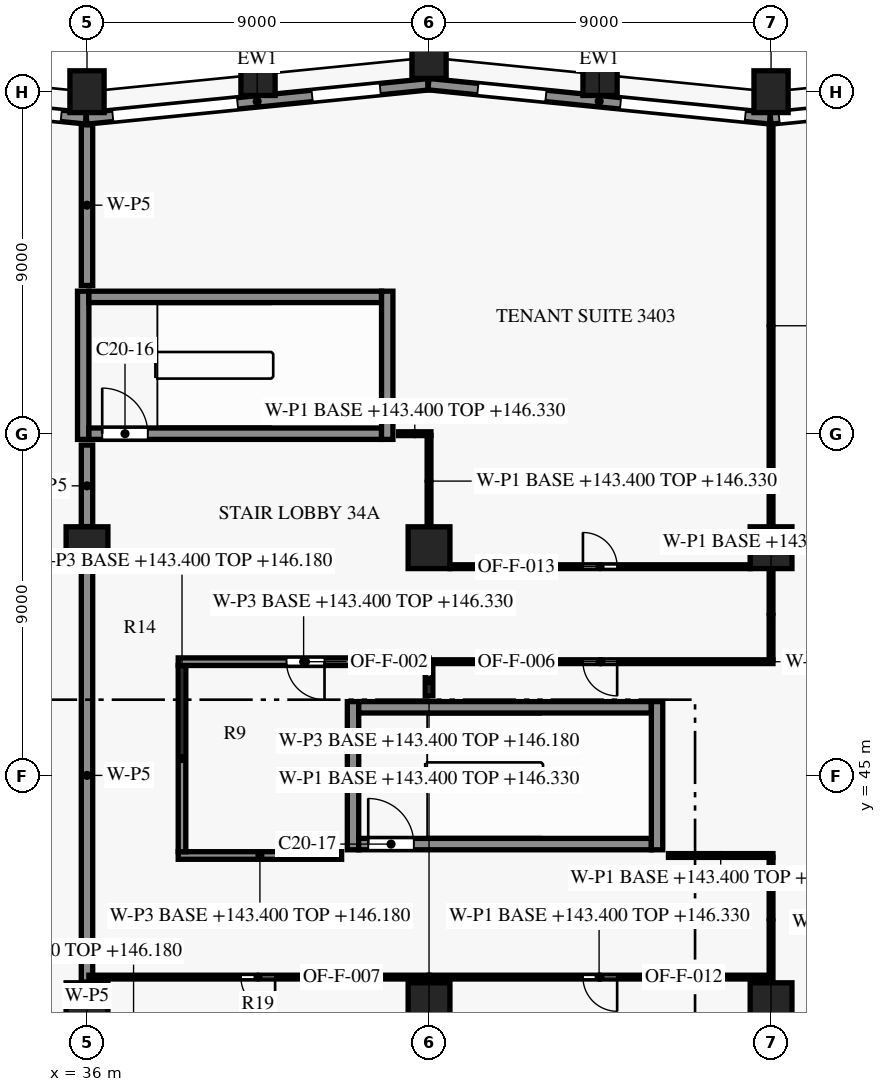
"""IFC4 building model, lengths in metres.
Left out: names, types, materials, properties, quantities, classifications, styles, units other than length and angle.
Written with IfcOpenShell. Run it as: python <this file> out.ifc"""

import sys

from ifc_helpers import new_model, si_unit, direction, frame, frame_2d, origin, origin_2d, place, context, subcontext, project, spatial, rectangle, extrude, element, fill, save


model = new_model("IFC4")
c1 = context("Model", 3, precision=1e-05, world=origin(), true_north=direction((0.0, 1.0)))
c2 = subcontext(c1, "Body", "Model", "MODEL_VIEW")
j1 = project(units=[si_unit("LENGTHUNIT", "METRE"), si_unit("PLANEANGLEUNIT", "RADIAN")], contexts=[c1])
p1 = place(None, origin())
s1 = spatial("IfcSite", under=j1, at=p1, CompositionType="ELEMENT")
p2 = place(p1, origin())
s2 = spatial("IfcBuilding", under=s1, at=p2, CompositionType="ELEMENT")
p3 = place(p2, frame((0.0, 0.0, 143.4)))
s3 = spatial("IfcBuildingStorey", under=s2, at=p3, CompositionType="ELEMENT", Elevation=143.4)
for number, where, z_axis, x_axis in (
    (1, (54.0, 63.0, 0.0), (0.0, 0.0, 1.0), (-1.0, 0.0, 0.0)),
    (2, (49.5, 63.45, 0.0), (0.0, 0.0, 1.0), (-0.995, 0.1, 0.0)),
    (3, (45.0, 63.9, 0.0), (0.0, 0.0, 1.0), (-1.0, 0.0, 0.0)),
    (4, (40.5, 63.45, 0.0), (0.0, 0.0, 1.0), (-0.995, -0.1, 0.0)),
    (5, (36.0, 63.0, 0.0), (0.0, 0.0, 1.0), (-1.0, 0.0, 0.0)),
):
    element("IfcColumn", number, at=place(p3, frame(where, z_axis=z_axis, x_axis=x_axis)), inside=s3, PredefinedType="COLUMN", context=c2, shape_type="SweptSolid", body=[
        extrude(rectangle(XDim=0.9, YDim=1.1, at=origin_2d()), origin(), (0.0, 0.0, 1.0), 3.8),
    ])
for number, where, z_axis, x_axis in (
    (6, (36.0, 39.0, 0.0), (0.0, 0.0, 1.0), (1.0, 0.0, 0.0)),
    (7, (36.0, 51.0, 0.0), (0.0, 0.0, 1.0), (1.0, 0.0, 0.0)),
    (8, (45.0, 39.0, 0.0), (0.0, 0.0, 1.0), (1.0, 0.0, 0.0)),
    (9, (45.0, 51.0, 0.0), (0.0, 0.0, 1.0), (1.0, 0.0, 0.0)),
    (10, (54.0, 39.0, 0.0), (0.0, 0.0, 1.0), (1.0, 0.0, 0.0)),
    (11, (54.0, 51.0, 0.0), (0.0, 0.0, 1.0), (1.0, 0.0, 0.0)),
):
    element("IfcColumn", number, at=place(p3, frame(where, z_axis=z_axis, x_axis=x_axis)), inside=s3, PredefinedType="COLUMN", context=c2, shape_type="SweptSolid", body=[
        extrude(rectangle(XDim=1.1, YDim=1.1, at=origin_2d()), origin(), (0.0, 0.0, 1.0), 3.8),
    ])
p4 = place(p3, frame((53.985, 62.295, 0.0), z_axis=(0.0, 0.0, 1.0), x_axis=(0.99503719021, 0.099503719021, 0.0)))
e12 = element("IfcWall", 12, at=p4, inside=s3, PredefinedType="SOLIDWALL", context=c2, shape_type="SweptSolid", body=[
    extrude(rectangle(XDim=3.678, YDim=0.3, at=frame_2d((1.839, 0.0))), origin(), (0.0, 0.0, 1.0), 3.15),
])
p5 = place(p4, frame((0.228, 0.0, 0.15)))
e13 = element("IfcOpeningElement", 13, at=p5, cuts=e12, PredefinedType="OPENING", context=c2, shape_type="SweptSolid", body=[
    extrude(rectangle(XDim=3.3, YDim=2.4, at=frame_2d((1.65, 1.2))), frame((0.0, 0.16, 0.0), z_axis=(0.0, -1.0, 0.0), x_axis=(1.0, 0.0, 0.0)), (0.0, 0.0, 1.0), 0.32),
])
p6 = place(p3, frame((44.985, 63.198, 0.0), z_axis=(0.0, 0.0, 1.0), x_axis=(0.995037993253, -0.099495688264, 0.0)))
e14 = element("IfcWall", 14, at=p6, inside=s3, PredefinedType="SOLIDWALL", context=c2, shape_type="SweptSolid", body=[
    extrude(rectangle(XDim=9.03, YDim=0.3, at=frame_2d((4.515, 0.0))), origin(), (0.0, 0.0, 1.0), 3.15),
])
p7 = place(p6, frame((1.306, 0.0, 0.75)))
e15 = element("IfcOpeningElement", 15, at=p7, cuts=e14, PredefinedType="OPENING", context=c2, shape_type="SweptSolid", body=[
    extrude(rectangle(XDim=1.8, YDim=1.8, at=frame_2d((0.9, 0.9))), frame((0.0, 0.16, 0.0), z_axis=(0.0, -1.0, 0.0), x_axis=(1.0, 0.0, 0.0)), (0.0, 0.0, 1.0), 0.32),
])
p8 = place(p6, frame((5.079, 0.0, 0.15)))
e16 = element("IfcOpeningElement", 16, at=p8, cuts=e14, PredefinedType="OPENING", context=c2, shape_type="SweptSolid", body=[
    extrude(rectangle(XDim=3.3, YDim=2.4, at=frame_2d((1.65, 1.2))), frame((0.0, 0.16, 0.0), z_axis=(0.0, -1.0, 0.0), x_axis=(1.0, 0.0, 0.0)), (0.0, 0.0, 1.0), 0.32),
])
p9 = place(p3, frame((35.985, 62.295, 0.0), z_axis=(0.0, 0.0, 1.0), x_axis=(0.995035316196, 0.099522457379, 0.0)))
e17 = element("IfcWall", 17, at=p9, inside=s3, PredefinedType="SOLIDWALL", context=c2, shape_type="SweptSolid", body=[
    extrude(rectangle(XDim=9.03, YDim=0.3, at=frame_2d((4.515, 0.0))), origin(), (0.0, 0.0, 1.0), 3.15),
])
p10 = place(p9, frame((0.696, 0.0, 0.15)))
e18 = element("IfcOpeningElement", 18, at=p10, cuts=e17, PredefinedType="OPENING", context=c2, shape_type="SweptSolid", body=[
    extrude(rectangle(XDim=3.3, YDim=2.4, at=frame_2d((1.65, 1.2))), frame((0.0, 0.16, 0.0), z_axis=(0.0, -1.0, 0.0), x_axis=(1.0, 0.0, 0.0)), (0.0, 0.0, 1.0), 0.32),
])
p11 = place(p9, frame((5.969, 0.0, 0.75)))
e19 = element("IfcOpeningElement", 19, at=p11, cuts=e17, PredefinedType="OPENING", context=c2, shape_type="SweptSolid", body=[
    extrude(rectangle(XDim=1.8, YDim=1.8, at=frame_2d((0.9, 0.9))), frame((0.0, 0.16, 0.0), z_axis=(0.0, -1.0, 0.0), x_axis=(1.0, 0.0, 0.0)), (0.0, 0.0, 1.0), 0.32),
])
p12 = place(p3, frame((27.08, 63.189, 0.0), z_axis=(0.0, 0.0, 1.0), x_axis=(0.995036108007, -0.099514540459, 0.0)))
e20 = element("IfcWall", 20, at=p12, inside=s3, PredefinedType="SOLIDWALL", context=c2, shape_type="SweptSolid", body=[
    extrude(rectangle(XDim=8.935, YDim=0.3, at=frame_2d((4.468, 0.0))), origin(), (0.0, 0.0, 1.0), 3.15),
])
p13 = place(p12, frame((1.211, 0.0, 0.75)))
e21 = element("IfcOpeningElement", 21, at=p13, cuts=e20, PredefinedType="OPENING", context=c2, shape_type="SweptSolid", body=[
    extrude(rectangle(XDim=1.8, YDim=1.8, at=frame_2d((0.9, 0.9))), frame((0.0, 0.16, 0.0), z_axis=(0.0, -1.0, 0.0), x_axis=(1.0, 0.0, 0.0)), (0.0, 0.0, 1.0), 0.32),
])
p14 = place(p12, frame((4.984, 0.0, 0.15)))
e22 = element("IfcOpeningElement", 22, at=p14, cuts=e20, PredefinedType="OPENING", context=c2, shape_type="SweptSolid", body=[
    extrude(rectangle(XDim=3.3, YDim=2.4, at=frame_2d((1.65, 1.2))), frame((0.0, 0.16, 0.0), z_axis=(0.0, -1.0, 0.0), x_axis=(1.0, 0.0, 0.0)), (0.0, 0.0, 1.0), 0.32),
])
p15 = place(p3, frame((43.15, 43.2, 0.0), z_axis=(0.0, 0.0, 1.0), x_axis=(1.0, 0.0, 0.0)))
e23 = element("IfcWall", 23, at=p15, inside=s3, PredefinedType="SHEAR", context=c2, shape_type="SweptSolid", body=[
    extrude(rectangle(XDim=7.7, YDim=0.3, at=frame_2d((3.85, 0.0))), origin(), (0.0, 0.0, 1.0), 3.5),
])
p16 = place(p15, frame((0.25, 0.0, 0.0)))
e24 = element("IfcOpeningElement", 24, at=p16, cuts=e23, PredefinedType="OPENING", context=c2, shape_type="SweptSolid", body=[
    extrude(rectangle(XDim=1.2, YDim=2.2, at=frame_2d((0.6, 1.1))), frame((0.0, 0.16, 0.0), z_axis=(0.0, -1.0, 0.0), x_axis=(1.0, 0.0, 0.0)), (0.0, 0.0, 1.0), 0.32),
])
p17 = place(p3, frame((43.15, 46.8, 0.0), z_axis=(0.0, 0.0, 1.0), x_axis=(1.0, 0.0, 0.0)))
e25 = element("IfcWall", 25, at=p17, inside=s3, PredefinedType="SHEAR", context=c2, shape_type="SweptSolid", body=[
    extrude(rectangle(XDim=7.7, YDim=0.3, at=frame_2d((3.85, 0.0))), origin(), (0.0, 0.0, 1.0), 3.5),
])
p18 = place(p3, frame((36.05, 54.0, 0.0), z_axis=(0.0, 0.0, 1.0), x_axis=(1.0, 0.0, 0.0)))
e26 = element("IfcWall", 26, at=p18, inside=s3, PredefinedType="SHEAR", context=c2, shape_type="SweptSolid", body=[
    extrude(rectangle(XDim=7.7, YDim=0.3, at=frame_2d((3.85, 0.0))), origin(), (0.0, 0.0, 1.0), 3.5),
])
p19 = place(p18, frame((0.35, 0.0, 0.0)))
e27 = element("IfcOpeningElement", 27, at=p19, cuts=e26, PredefinedType="OPENING", context=c2, shape_type="SweptSolid", body=[
    extrude(rectangle(XDim=1.2, YDim=2.2, at=frame_2d((0.6, 1.1))), frame((0.0, 0.16, 0.0), z_axis=(0.0, -1.0, 0.0), x_axis=(1.0, 0.0, 0.0)), (0.0, 0.0, 1.0), 0.32),
])
p20 = place(p3, frame((36.05, 57.6, 0.0), z_axis=(0.0, 0.0, 1.0), x_axis=(1.0, 0.0, 0.0)))
e28 = element("IfcWall", 28, at=p20, inside=s3, PredefinedType="SHEAR", context=c2, shape_type="SweptSolid", body=[
    extrude(rectangle(XDim=7.7, YDim=0.3, at=frame_2d((3.85, 0.0))), origin(), (0.0, 0.0, 1.0), 3.5),
])
for number, where, z_axis, x_axis in (
    (29, (35.9, 53.85, 0.0), (0.0, 0.0, 1.0), (0.0, 1.0, 0.0)),
    (30, (43.0, 43.05, 0.0), (0.0, 0.0, 1.0), (0.0, 1.0, 0.0)),
    (31, (43.9, 53.85, 0.0), (0.0, 0.0, 1.0), (0.0, 1.0, 0.0)),
    (32, (51.0, 43.05, 0.0), (0.0, 0.0, 1.0), (0.0, 1.0, 0.0)),
):
    element("IfcWall", number, at=place(p3, frame(where, z_axis=z_axis, x_axis=x_axis)), inside=s3, PredefinedType="SHEAR", context=c2, shape_type="SweptSolid", body=[
        extrude(rectangle(XDim=3.9, YDim=0.3, at=frame_2d((1.95, 0.0))), origin(), (0.0, 0.0, 1.0), 3.5),
    ])
p21 = place(p3, frame((45.0, 39.7, 0.0), z_axis=(0.0, 0.0, 1.0), x_axis=(-1.0, 0.0, 0.0)))
e33 = element("IfcWall", 33, at=p21, inside=s3, PredefinedType="PARTITIONING", context=c2, shape_type="SweptSolid", body=[
    extrude(rectangle(XDim=8.95, YDim=0.1, at=frame_2d((4.475, 0.0))), origin(), (0.0, 0.0, 1.0), 2.78),
])
p22 = place(p21, frame((4.05, 0.0, 0.0)))
e34 = element("IfcOpeningElement", 34, at=p22, cuts=e33, PredefinedType="OPENING", context=c2, shape_type="SweptSolid", body=[
    extrude(rectangle(XDim=0.9, YDim=2.1, at=frame_2d((0.45, 1.05))), frame((0.0, 0.06, 0.0), z_axis=(0.0, -1.0, 0.0), x_axis=(1.0, 0.0, 0.0)), (0.0, 0.0, 1.0), 0.12),
])
p23 = place(p3, frame((53.95, 39.7, 0.0), z_axis=(0.0, 0.0, 1.0), x_axis=(-1.0, 0.0, 0.0)))
e35 = element("IfcWall", 35, at=p23, inside=s3, PredefinedType="PARTITIONING", context=c2, shape_type="SweptSolid", body=[
    extrude(rectangle(XDim=8.95, YDim=0.1, at=frame_2d((4.475, 0.0))), origin(), (0.0, 0.0, 1.0), 2.93),
])
p24 = place(p23, frame((4.0, 0.0, 0.0)))
e36 = element("IfcOpeningElement", 36, at=p24, cuts=e35, PredefinedType="OPENING", context=c2, shape_type="SweptSolid", body=[
    extrude(rectangle(XDim=0.9, YDim=2.1, at=frame_2d((0.45, 1.05))), frame((0.0, 0.06, 0.0), z_axis=(0.0, -1.0, 0.0), x_axis=(1.0, 0.0, 0.0)), (0.0, 0.0, 1.0), 0.12),
])
p25 = place(p3, frame((36.0, 39.57, 0.0), z_axis=(0.0, 0.0, 1.0), x_axis=(0.0, 1.0, 0.0)))
e37 = element("IfcWall", 37, at=p25, inside=s3, PredefinedType="PARTITIONING", context=c2, shape_type="SweptSolid", body=[
    extrude(rectangle(XDim=10.875, YDim=0.3, at=frame_2d((5.438, 0.0))), origin(), (0.0, 0.0, 1.0), 2.78),
])
p26 = place(p3, frame((54.0, 42.85, 0.0), z_axis=(0.0, 0.0, 1.0), x_axis=(0.0, -1.0, 0.0)))
e38 = element("IfcWall", 38, at=p26, inside=s3, PredefinedType="PARTITIONING", context=c2, shape_type="SweptSolid", body=[
    extrude(rectangle(XDim=3.28, YDim=0.1, at=frame_2d((1.64, 0.0))), origin(), (0.0, 0.0, 1.0), 2.93),
])
p27 = place(p3, frame((38.4, 42.9, 0.0), z_axis=(0.0, 0.0, 1.0), x_axis=(1.0, 0.0, 0.0)))
e39 = element("IfcWall", 39, at=p27, inside=s3, PredefinedType="PARTITIONING", context=c2, shape_type="SweptSolid", body=[
    extrude(rectangle(XDim=4.3, YDim=0.2, at=frame_2d((2.15, 0.0))), origin(), (0.0, 0.0, 1.0), 2.78),
])
p28 = place(p3, frame((51.3, 42.9, 0.0), z_axis=(0.0, 0.0, 1.0), x_axis=(1.0, 0.0, 0.0)))
e40 = element("IfcWall", 40, at=p28, inside=s3, PredefinedType="PARTITIONING", context=c2, shape_type="SweptSolid", body=[
    extrude(rectangle(XDim=2.75, YDim=0.1, at=frame_2d((1.375, 0.0))), origin(), (0.0, 0.0, 1.0), 2.78),
])
p29 = place(p3, frame((38.5, 47.9, 0.0), z_axis=(0.0, 0.0, 1.0), x_axis=(0.0, -1.0, 0.0)))
e41 = element("IfcWall", 41, at=p29, inside=s3, PredefinedType="PARTITIONING", context=c2, shape_type="SweptSolid", body=[
    extrude(rectangle(XDim=4.9, YDim=0.2, at=frame_2d((2.45, 0.0))), origin(), (0.0, 0.0, 1.0), 2.78),
])
p30 = place(p3, frame((45.0, 47.9, 0.0), z_axis=(0.0, 0.0, 1.0), x_axis=(0.0, -1.0, 0.0)))
e42 = element("IfcWall", 42, at=p30, inside=s3, PredefinedType="PARTITIONING", context=c2, shape_type="SweptSolid", body=[
    extrude(rectangle(XDim=0.8, YDim=0.2, at=frame_2d((0.4, 0.0))), origin(), (0.0, 0.0, 1.0), 2.78),
])
p31 = place(p3, frame((45.0, 48.0, 0.0), z_axis=(0.0, 0.0, 1.0), x_axis=(-1.0, 0.0, 0.0)))
e43 = element("IfcWall", 43, at=p31, inside=s3, PredefinedType="PARTITIONING", context=c2, shape_type="SweptSolid", body=[
    extrude(rectangle(XDim=6.6, YDim=0.2, at=frame_2d((3.3, 0.0))), origin(), (0.0, 0.0, 1.0), 2.93),
])
p32 = place(p31, frame((2.75, 0.0, 0.0)))
e44 = element("IfcOpeningElement", 44, at=p32, cuts=e43, PredefinedType="OPENING", context=c2, shape_type="SweptSolid", body=[
    extrude(rectangle(XDim=1.0, YDim=2.1, at=frame_2d((0.5, 1.05))), frame((0.0, 0.11, 0.0), z_axis=(0.0, -1.0, 0.0), x_axis=(1.0, 0.0, 0.0)), (0.0, 0.0, 1.0), 0.22),
])
p33 = place(p3, frame((54.05, 48.0, 0.0), z_axis=(0.0, 0.0, 1.0), x_axis=(-1.0, 0.0, 0.0)))
e45 = element("IfcWall", 45, at=p33, inside=s3, PredefinedType="PARTITIONING", context=c2, shape_type="SweptSolid", body=[
    extrude(rectangle(XDim=9.05, YDim=0.1, at=frame_2d((4.525, 0.0))), origin(), (0.0, 0.0, 1.0), 2.93),
])
p34 = place(p33, frame((4.1, 0.0, 0.0)))
e46 = element("IfcOpeningElement", 46, at=p34, cuts=e45, PredefinedType="OPENING", context=c2, shape_type="SweptSolid", body=[
    extrude(rectangle(XDim=0.9, YDim=2.1, at=frame_2d((0.45, 1.05))), frame((0.0, 0.06, 0.0), z_axis=(0.0, -1.0, 0.0), x_axis=(1.0, 0.0, 0.0)), (0.0, 0.0, 1.0), 0.12),
])
p35 = place(p3, frame((54.0, 50.445, 0.0), z_axis=(0.0, 0.0, 1.0), x_axis=(0.0, -1.0, 0.0)))
e47 = element("IfcWall", 47, at=p35, inside=s3, PredefinedType="PARTITIONING", context=c2, shape_type="SweptSolid", body=[
    extrude(rectangle(XDim=2.395, YDim=0.1, at=frame_2d((1.198, 0.0))), origin(), (0.0, 0.0, 1.0), 2.93),
])
p36 = place(p3, frame((45.555, 50.5, 0.0), z_axis=(0.0, 0.0, 1.0), x_axis=(1.0, 0.0, 0.0)))
e48 = element("IfcWall", 48, at=p36, inside=s3, PredefinedType="PARTITIONING", context=c2, shape_type="SweptSolid", body=[
    extrude(rectangle(XDim=7.89, YDim=0.1, at=frame_2d((3.945, 0.0))), origin(), (0.0, 0.0, 1.0), 3.48),
])
p37 = place(p36, frame((3.495, 0.0, 0.0)))
e49 = element("IfcOpeningElement", 49, at=p37, cuts=e48, PredefinedType="OPENING", context=c2, shape_type="SweptSolid", body=[
    extrude(rectangle(XDim=0.9, YDim=2.1, at=frame_2d((0.45, 1.05))), frame((0.0, 0.06, 0.0), z_axis=(0.0, -1.0, 0.0), x_axis=(1.0, 0.0, 0.0)), (0.0, 0.0, 1.0), 0.12),
])
p38 = place(p3, frame((36.0, 51.555, 0.0), z_axis=(0.0, 0.0, 1.0), x_axis=(0.0, 1.0, 0.0)))
e50 = element("IfcWall", 50, at=p38, inside=s3, PredefinedType="PARTITIONING", context=c2, shape_type="SweptSolid", body=[
    extrude(rectangle(XDim=2.145, YDim=0.3, at=frame_2d((1.073, 0.0))), origin(), (0.0, 0.0, 1.0), 2.78),
])
p39 = place(p3, frame((54.0, 51.555, 0.0), z_axis=(0.0, 0.0, 1.0), x_axis=(0.0, 1.0, 0.0)))
e51 = element("IfcWall", 51, at=p39, inside=s3, PredefinedType="PARTITIONING", context=c2, shape_type="SweptSolid", body=[
    extrude(rectangle(XDim=10.571, YDim=0.1, at=frame_2d((5.285, 0.0))), origin(), (0.0, 0.0, 1.0), 2.93),
])
p40 = place(p3, frame((45.0, 53.95, 0.0), z_axis=(0.0, 0.0, 1.0), x_axis=(0.0, -1.0, 0.0)))
e52 = element("IfcWall", 52, at=p40, inside=s3, PredefinedType="PARTITIONING", context=c2, shape_type="SweptSolid", body=[
    extrude(rectangle(XDim=2.395, YDim=0.1, at=frame_2d((1.198, 0.0))), origin(), (0.0, 0.0, 1.0), 2.93),
])
p41 = place(p3, frame((44.2, 54.0, 0.0), z_axis=(0.0, 0.0, 1.0), x_axis=(1.0, 0.0, 0.0)))
e53 = element("IfcWall", 53, at=p41, inside=s3, PredefinedType="PARTITIONING", context=c2, shape_type="SweptSolid", body=[
    extrude(rectangle(XDim=0.85, YDim=0.1, at=frame_2d((0.425, 0.0))), origin(), (0.0, 0.0, 1.0), 2.93),
])
p42 = place(p3, frame((36.0, 57.9, 0.0), z_axis=(0.0, 0.0, 1.0), x_axis=(0.0, 1.0, 0.0)))
e54 = element("IfcWall", 54, at=p42, inside=s3, PredefinedType="PARTITIONING", context=c2, shape_type="SweptSolid", body=[
    extrude(rectangle(XDim=4.226, YDim=0.3, at=frame_2d((2.113, 0.0))), origin(), (0.0, 0.0, 1.0), 2.78),
])
p43 = place(p5, origin())
e55 = element("IfcWindow", 55, at=p43, inside=s3, PartitioningType="SINGLE_PANEL", PredefinedType="WINDOW", context=c2, shape_type="SweptSolid", body=[
    extrude(rectangle(XDim=3.3, YDim=2.4, at=frame_2d((1.65, 1.2))), frame((0.0, 0.03, 0.0), z_axis=(0.0, -1.0, 0.0), x_axis=(1.0, 0.0, 0.0)), (0.0, 0.0, 1.0), 0.06),
])
fill(e13, e55)
p44 = place(p7, origin())
e56 = element("IfcWindow", 56, at=p44, inside=s3, PartitioningType="SINGLE_PANEL", PredefinedType="WINDOW", context=c2, shape_type="SweptSolid", body=[
    extrude(rectangle(XDim=1.8, YDim=1.8, at=frame_2d((0.9, 0.9))), frame((0.0, 0.03, 0.0), z_axis=(0.0, -1.0, 0.0), x_axis=(1.0, 0.0, 0.0)), (0.0, 0.0, 1.0), 0.06),
])
fill(e15, e56)
p45 = place(p8, origin())
e57 = element("IfcWindow", 57, at=p45, inside=s3, PartitioningType="SINGLE_PANEL", PredefinedType="WINDOW", context=c2, shape_type="SweptSolid", body=[
    extrude(rectangle(XDim=3.3, YDim=2.4, at=frame_2d((1.65, 1.2))), frame((0.0, 0.03, 0.0), z_axis=(0.0, -1.0, 0.0), x_axis=(1.0, 0.0, 0.0)), (0.0, 0.0, 1.0), 0.06),
])
fill(e16, e57)
p46 = place(p10, origin())
e58 = element("IfcWindow", 58, at=p46, inside=s3, PartitioningType="SINGLE_PANEL", PredefinedType="WINDOW", context=c2, shape_type="SweptSolid", body=[
    extrude(rectangle(XDim=3.3, YDim=2.4, at=frame_2d((1.65, 1.2))), frame((0.0, 0.03, 0.0), z_axis=(0.0, -1.0, 0.0), x_axis=(1.0, 0.0, 0.0)), (0.0, 0.0, 1.0), 0.06),
])
fill(e18, e58)
p47 = place(p11, origin())
e59 = element("IfcWindow", 59, at=p47, inside=s3, PartitioningType="SINGLE_PANEL", PredefinedType="WINDOW", context=c2, shape_type="SweptSolid", body=[
    extrude(rectangle(XDim=1.8, YDim=1.8, at=frame_2d((0.9, 0.9))), frame((0.0, 0.03, 0.0), z_axis=(0.0, -1.0, 0.0), x_axis=(1.0, 0.0, 0.0)), (0.0, 0.0, 1.0), 0.06),
])
fill(e19, e59)
p48 = place(p14, origin())
e60 = element("IfcWindow", 60, at=p48, inside=s3, PartitioningType="SINGLE_PANEL", PredefinedType="WINDOW", context=c2, shape_type="SweptSolid", body=[
    extrude(rectangle(XDim=3.3, YDim=2.4, at=frame_2d((1.65, 1.2))), frame((0.0, 0.03, 0.0), z_axis=(0.0, -1.0, 0.0), x_axis=(1.0, 0.0, 0.0)), (0.0, 0.0, 1.0), 0.06),
])
fill(e22, e60)
p49 = place(p19, origin())
e61 = element("IfcDoor", 61, at=p49, inside=s3, OperationType="SINGLE_SWING_LEFT", PredefinedType="DOOR", context=c2, shape_type="SweptSolid", body=[
    extrude(rectangle(XDim=1.2, YDim=2.2, at=frame_2d((0.6, 1.1))), frame((0.0, 0.025, 0.0), z_axis=(0.0, -1.0, 0.0), x_axis=(1.0, 0.0, 0.0)), (0.0, 0.0, 1.0), 0.05),
])
fill(e27, e61)
p50 = place(p16, origin())
e62 = element("IfcDoor", 62, at=p50, inside=s3, OperationType="SINGLE_SWING_RIGHT", PredefinedType="DOOR", context=c2, shape_type="SweptSolid", body=[
    extrude(rectangle(XDim=1.2, YDim=2.2, at=frame_2d((0.6, 1.1))), frame((0.0, 0.025, 0.0), z_axis=(0.0, -1.0, 0.0), x_axis=(1.0, 0.0, 0.0)), (0.0, 0.0, 1.0), 0.05),
])
fill(e24, e62)
p51 = place(p32, origin())
e63 = element("IfcDoor", 63, at=p51, inside=s3, OperationType="SINGLE_SWING_RIGHT", PredefinedType="DOOR", context=c2, shape_type="SweptSolid", body=[
    extrude(rectangle(XDim=1.0, YDim=2.1, at=frame_2d((0.5, 1.05))), frame((0.0, 0.025, 0.0), z_axis=(0.0, -1.0, 0.0), x_axis=(1.0, 0.0, 0.0)), (0.0, 0.0, 1.0), 0.05),
])
fill(e44, e63)
p52 = place(p34, origin())
e64 = element("IfcDoor", 64, at=p52, inside=s3, OperationType="SINGLE_SWING_RIGHT", PredefinedType="DOOR", context=c2, shape_type="SweptSolid", body=[
    extrude(rectangle(XDim=0.9, YDim=2.1, at=frame_2d((0.45, 1.05))), frame((0.0, 0.025, 0.0), z_axis=(0.0, -1.0, 0.0), x_axis=(1.0, 0.0, 0.0)), (0.0, 0.0, 1.0), 0.05),
])
fill(e46, e64)
p53 = place(p22, origin())
e65 = element("IfcDoor", 65, at=p53, inside=s3, OperationType="SINGLE_SWING_LEFT", PredefinedType="DOOR", context=c2, shape_type="SweptSolid", body=[
    extrude(rectangle(XDim=0.9, YDim=2.1, at=frame_2d((0.45, 1.05))), frame((0.0, 0.025, 0.0), z_axis=(0.0, -1.0, 0.0), x_axis=(1.0, 0.0, 0.0)), (0.0, 0.0, 1.0), 0.05),
])
fill(e34, e65)
p54 = place(p24, origin())
e66 = element("IfcDoor", 66, at=p54, inside=s3, OperationType="SINGLE_SWING_LEFT", PredefinedType="DOOR", context=c2, shape_type="SweptSolid", body=[
    extrude(rectangle(XDim=0.9, YDim=2.1, at=frame_2d((0.45, 1.05))), frame((0.0, 0.025, 0.0), z_axis=(0.0, -1.0, 0.0), x_axis=(1.0, 0.0, 0.0)), (0.0, 0.0, 1.0), 0.05),
])
fill(e36, e66)
p55 = place(p37, origin())
e67 = element("IfcDoor", 67, at=p55, inside=s3, OperationType="SINGLE_SWING_LEFT", PredefinedType="DOOR", context=c2, shape_type="SweptSolid", body=[
    extrude(rectangle(XDim=0.9, YDim=2.1, at=frame_2d((0.45, 1.05))), frame((0.0, 0.025, 0.0), z_axis=(0.0, -1.0, 0.0), x_axis=(1.0, 0.0, 0.0)), (0.0, 0.0, 1.0), 0.05),
])
fill(e49, e67)
save(model, sys.argv[1])
